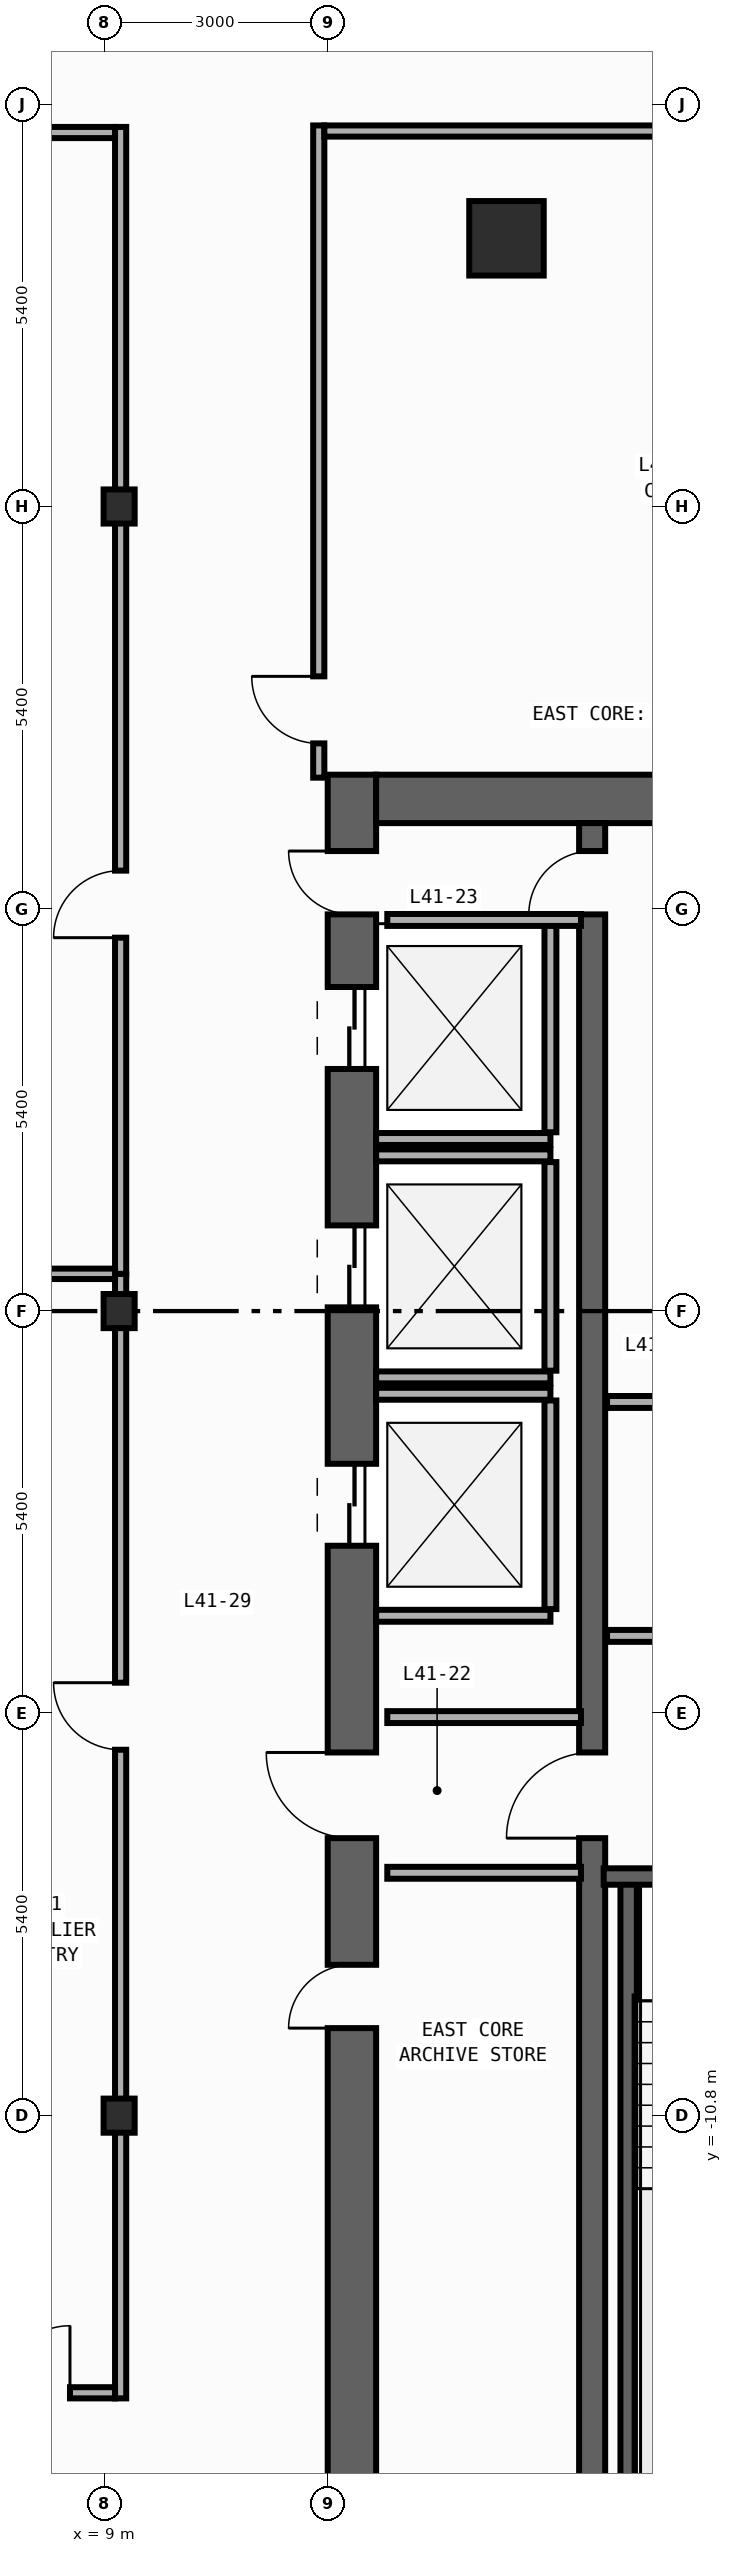
"""IFC4 building model, lengths in metres.
Left out: names, types, materials, properties, quantities, classifications, styles, units other than length and angle.
Written with IfcOpenShell. Run it as: python <this file> out.ifc"""

import sys

from ifc_helpers import new_model, si_unit, direction, frame, frame_2d, origin, origin_2d, place, context, subcontext, project, spatial, rectangle, i_section, extrude, element, fill, save


model = new_model("IFC4")
c1 = context("Model", 3, precision=1e-05, world=origin(), true_north=direction((0.0, 1.0)))
c2 = subcontext(c1, "Body", "Model", "MODEL_VIEW")
j1 = project(units=[si_unit("LENGTHUNIT", "METRE"), si_unit("PLANEANGLEUNIT", "RADIAN")], contexts=[c1])
p1 = place(None, origin())
s1 = spatial("IfcSite", under=j1, at=p1, CompositionType="ELEMENT")
p2 = place(p1, origin())
s2 = spatial("IfcBuilding", under=s1, at=p2, CompositionType="ELEMENT")
p3 = place(p2, frame((0.0, 0.0, 180.2)))
s3 = spatial("IfcBuildingStorey", under=s2, at=p3, CompositionType="ELEMENT", Elevation=180.2)
p4 = place(p3, frame((12.325, -19.8, 0.0), z_axis=(0.0, 0.0, 1.0), x_axis=(0.0, 1.0, 0.0)))
e1 = element("IfcWall", 1, at=p4, inside=s3, PredefinedType="SHEAR", context=c2, shape_type="SweptSolid", body=[
    extrude(rectangle(XDim=27.0, YDim=0.65, at=frame_2d((13.5, 0.0))), origin(), (0.0, 0.0, 1.0), 3.54),
])
p5 = place(p4, frame((23.05, 0.0, 0.0)))
e2 = element("IfcOpeningElement", 2, at=p5, cuts=e1, PredefinedType="OPENING", context=c2, shape_type="SweptSolid", body=[
    extrude(rectangle(XDim=1.1, YDim=2.2, at=frame_2d((0.55, 1.1))), frame((0.0, 0.335, 0.0), z_axis=(0.0, -1.0, 0.0), x_axis=(1.0, 0.0, 0.0)), (0.0, 0.0, 1.0), 0.67),
])
p6 = place(p4, frame((19.85, 0.0, 0.0)))
e3 = element("IfcOpeningElement", 3, at=p6, cuts=e1, PredefinedType="OPENING", context=c2, shape_type="SweptSolid", body=[
    extrude(rectangle(XDim=1.1, YDim=2.2, at=frame_2d((0.55, 1.1))), frame((0.0, 0.335, 0.0), z_axis=(0.0, -1.0, 0.0), x_axis=(1.0, 0.0, 0.0)), (0.0, 0.0, 1.0), 0.67),
])
p7 = place(p4, frame((16.65, 0.0, 0.0)))
e4 = element("IfcOpeningElement", 4, at=p7, cuts=e1, PredefinedType="OPENING", context=c2, shape_type="SweptSolid", body=[
    extrude(rectangle(XDim=1.1, YDim=2.2, at=frame_2d((0.55, 1.1))), frame((0.0, 0.335, 0.0), z_axis=(0.0, -1.0, 0.0), x_axis=(1.0, 0.0, 0.0)), (0.0, 0.0, 1.0), 0.67),
])
p8 = place(p4, frame((10.175, 0.0, 0.0)))
e5 = element("IfcOpeningElement", 5, at=p8, cuts=e1, PredefinedType="OPENING", context=c2, shape_type="SweptSolid", body=[
    extrude(rectangle(XDim=0.85, YDim=2.1, at=frame_2d((0.425, 1.05))), frame((0.0, 0.335, 0.0), z_axis=(0.0, -1.0, 0.0), x_axis=(1.0, 0.0, 0.0)), (0.0, 0.0, 1.0), 0.67),
])
p9 = place(p4, frame((12.725, 0.0, 0.0)))
e6 = element("IfcOpeningElement", 6, at=p9, cuts=e1, PredefinedType="OPENING", context=c2, shape_type="SweptSolid", body=[
    extrude(rectangle(XDim=1.15, YDim=2.2, at=frame_2d((0.575, 1.1))), frame((0.0, 0.335, 0.0), z_axis=(0.0, -1.0, 0.0), x_axis=(1.0, 0.0, 0.0)), (0.0, 0.0, 1.0), 0.67),
])
p10 = place(p4, frame((25.125, 0.0, 0.0)))
e7 = element("IfcOpeningElement", 7, at=p10, cuts=e1, PredefinedType="OPENING", context=c2, shape_type="SweptSolid", body=[
    extrude(rectangle(XDim=0.85, YDim=2.1, at=frame_2d((0.425, 1.05))), frame((0.0, 0.335, 0.0), z_axis=(0.0, -1.0, 0.0), x_axis=(1.0, 0.0, 0.0)), (0.0, 0.0, 1.0), 0.67),
])
p11 = place(p3, frame((12.65, 6.875, 0.0), z_axis=(0.0, 0.0, 1.0), x_axis=(1.0, 0.0, 0.0)))
e8 = element("IfcWall", 8, at=p11, inside=s3, PredefinedType="SHEAR", context=c2, shape_type="SweptSolid", body=[
    extrude(rectangle(XDim=7.1, YDim=0.65, at=frame_2d((3.55, 0.0))), origin(), (0.0, 0.0, 1.0), 3.54),
])
p12 = place(p3, frame((15.55, -19.15, 0.0), z_axis=(0.0, 0.0, 1.0), x_axis=(0.0, 1.0, 0.0)))
e9 = element("IfcWall", 9, at=p12, inside=s3, PredefinedType="SHEAR", context=c2, shape_type="SweptSolid", body=[
    extrude(rectangle(XDim=25.7, YDim=0.35, at=frame_2d((12.85, 0.0))), origin(), (0.0, 0.0, 1.0), 3.54),
])
p13 = place(p12, frame((12.075, 0.0, 0.0)))
e10 = element("IfcOpeningElement", 10, at=p13, cuts=e9, PredefinedType="OPENING", context=c2, shape_type="SweptSolid", body=[
    extrude(rectangle(XDim=1.15, YDim=2.2, at=frame_2d((0.575, 1.1))), frame((0.0, 0.185, 0.0), z_axis=(0.0, -1.0, 0.0), x_axis=(1.0, 0.0, 0.0)), (0.0, 0.0, 1.0), 0.37),
])
p14 = place(p12, frame((24.475, 0.0, 0.0)))
e11 = element("IfcOpeningElement", 11, at=p14, cuts=e9, PredefinedType="OPENING", context=c2, shape_type="SweptSolid", body=[
    extrude(rectangle(XDim=0.85, YDim=2.1, at=frame_2d((0.425, 1.05))), frame((0.0, 0.185, 0.0), z_axis=(0.0, -1.0, 0.0), x_axis=(1.0, 0.0, 0.0)), (0.0, 0.0, 1.0), 0.37),
])
p15 = place(p3, frame((16.04, -19.01, 0.0), z_axis=(0.0, 0.0, 1.0), x_axis=(0.0, 1.0, 0.0)))
e12 = element("IfcWall", 12, at=p15, inside=s3, PredefinedType="SHEAR", context=c2, shape_type="SweptSolid", body=[
    extrude(rectangle(XDim=11.42, YDim=0.22, at=frame_2d((5.71, 0.0))), origin(), (0.0, 0.0, 1.0), 3.54),
])
p16 = place(p3, frame((19.77, -7.59, 0.0), z_axis=(0.0, 0.0, 1.0), x_axis=(-1.0, 0.0, 0.0)))
e13 = element("IfcWall", 13, at=p16, inside=s3, PredefinedType="SHEAR", context=c2, shape_type="SweptSolid", body=[
    extrude(rectangle(XDim=4.065, YDim=0.22, at=frame_2d((2.032, 0.0))), origin(), (0.0, 0.0, 1.0), 3.54),
])
p17 = place(p16, frame((1.08, 0.0, 0.0)))
e14 = element("IfcOpeningElement", 14, at=p17, cuts=e13, PredefinedType="OPENING", context=c2, shape_type="SweptSolid", body=[
    extrude(rectangle(XDim=1.1, YDim=2.2, at=frame_2d((0.55, 1.1))), frame((0.0, 0.12, 0.0), z_axis=(0.0, -1.0, 0.0), x_axis=(1.0, 0.0, 0.0)), (0.0, 0.0, 1.0), 0.24),
])
for number, where, z_axis, x_axis in (
    (15, (9.2, -10.8, 0.0), (0.0, 0.0, 1.0), (1.0, 0.0, 0.0)),
    (16, (9.2, 0.0, 0.0), (0.0, 0.0, 1.0), (1.0, 0.0, 0.0)),
    (17, (9.2, 10.8, 0.0), (0.0, 0.0, 1.0), (1.0, 0.0, 0.0)),
):
    element("IfcColumn", number, at=place(p3, frame(where, z_axis=z_axis, x_axis=x_axis)), inside=s3, PredefinedType="COLUMN", context=c2, shape_type="SweptSolid", body=[
        extrude(i_section(OverallWidth=0.417, OverallDepth=0.458, WebThickness=0.03, FlangeThickness=0.05, FilletRadius=0.022, at=origin_2d()), origin(), (0.0, 0.0, 1.0), 3.8),
    ])
p18 = place(p3, frame((14.4, 14.4, 0.0), z_axis=(0.0, 0.0, 1.0), x_axis=(1.0, 0.0, 0.0)))
e18 = element("IfcColumn", 18, at=p18, inside=s3, PredefinedType="COLUMN", context=c2, shape_type="SweptSolid", body=[
    extrude(rectangle(XDim=1.0, YDim=1.0, at=origin_2d()), origin(), (0.0, 0.0, 1.0), 3.8),
])
p19 = place(p3, frame((12.65, 2.31, 0.0), z_axis=(0.0, 0.0, 1.0), x_axis=(1.0, 0.0, 0.0)))
e19 = element("IfcWall", 19, at=p19, inside=s3, PredefinedType="STANDARD", context=c2, shape_type="SweptSolid", body=[
    extrude(rectangle(XDim=2.34, YDim=0.16, at=frame_2d((1.17, 0.0))), origin(), (0.0, 0.0, 1.0), 3.54),
])
p20 = place(p3, frame((14.99, 2.4, 0.0), z_axis=(0.0, 0.0, 1.0), x_axis=(0.0, 1.0, 0.0)))
e20 = element("IfcWall", 20, at=p20, inside=s3, PredefinedType="STANDARD", context=c2, shape_type="SweptSolid", body=[
    extrude(rectangle(XDim=2.8, YDim=0.16, at=frame_2d((1.4, 0.0))), origin(), (0.0, 0.0, 1.0), 3.54),
])
for number, where, z_axis, x_axis in (
    (21, (12.65, -0.89, 0.0), (0.0, 0.0, 1.0), (1.0, 0.0, 0.0)),
    (22, (12.65, 2.09, 0.0), (0.0, 0.0, 1.0), (1.0, 0.0, 0.0)),
):
    element("IfcWall", number, at=place(p3, frame(where, z_axis=z_axis, x_axis=x_axis)), inside=s3, PredefinedType="STANDARD", context=c2, shape_type="SweptSolid", body=[
        extrude(rectangle(XDim=2.34, YDim=0.16, at=frame_2d((1.17, 0.0))), origin(), (0.0, 0.0, 1.0), 3.54),
    ])
p21 = place(p3, frame((14.99, -0.8, 0.0), z_axis=(0.0, 0.0, 1.0), x_axis=(0.0, 1.0, 0.0)))
e23 = element("IfcWall", 23, at=p21, inside=s3, PredefinedType="STANDARD", context=c2, shape_type="SweptSolid", body=[
    extrude(rectangle(XDim=2.8, YDim=0.16, at=frame_2d((1.4, 0.0))), origin(), (0.0, 0.0, 1.0), 3.54),
])
for number, where, z_axis, x_axis in (
    (24, (12.65, -4.09, 0.0), (0.0, 0.0, 1.0), (1.0, 0.0, 0.0)),
    (25, (12.65, -1.11, 0.0), (0.0, 0.0, 1.0), (1.0, 0.0, 0.0)),
):
    element("IfcWall", number, at=place(p3, frame(where, z_axis=z_axis, x_axis=x_axis)), inside=s3, PredefinedType="STANDARD", context=c2, shape_type="SweptSolid", body=[
        extrude(rectangle(XDim=2.34, YDim=0.16, at=frame_2d((1.17, 0.0))), origin(), (0.0, 0.0, 1.0), 3.54),
    ])
p22 = place(p3, frame((14.99, -4.0, 0.0), z_axis=(0.0, 0.0, 1.0), x_axis=(0.0, 1.0, 0.0)))
e26 = element("IfcWall", 26, at=p22, inside=s3, PredefinedType="STANDARD", context=c2, shape_type="SweptSolid", body=[
    extrude(rectangle(XDim=2.8, YDim=0.16, at=frame_2d((1.4, 0.0))), origin(), (0.0, 0.0, 1.0), 3.54),
])
p23 = place(p3, frame((15.75, -4.36, 0.0), z_axis=(0.0, 0.0, 1.0), x_axis=(1.0, 0.0, 0.0)))
e27 = element("IfcWall", 27, at=p23, inside=s3, PredefinedType="STANDARD", context=c2, shape_type="SweptSolid", body=[
    extrude(rectangle(XDim=3.8, YDim=0.16, at=frame_2d((1.9, 0.0))), origin(), (0.0, 0.0, 1.0), 3.54),
])
p24 = place(p23, frame((1.47, 0.0, 0.0)))
e28 = element("IfcOpeningElement", 28, at=p24, cuts=e27, PredefinedType="OPENING", context=c2, shape_type="SweptSolid", body=[
    extrude(rectangle(XDim=1.15, YDim=2.2, at=frame_2d((0.575, 1.1))), frame((0.0, 0.09, 0.0), z_axis=(0.0, -1.0, 0.0), x_axis=(1.0, 0.0, 0.0)), (0.0, 0.0, 1.0), 0.18),
])
p25 = place(p3, frame((15.75, -1.22, 0.0), z_axis=(0.0, 0.0, 1.0), x_axis=(1.0, 0.0, 0.0)))
e29 = element("IfcWall", 29, at=p25, inside=s3, PredefinedType="STANDARD", context=c2, shape_type="SweptSolid", body=[
    extrude(rectangle(XDim=3.8, YDim=0.16, at=frame_2d((1.9, 0.0))), origin(), (0.0, 0.0, 1.0), 3.54),
])
for number, where, z_axis, x_axis in (
    (30, (12.8, -5.45, 0.0), (0.0, 0.0, 1.0), (1.0, 0.0, 0.0)),
    (31, (12.8, -7.54, 0.0), (0.0, 0.0, 1.0), (1.0, 0.0, 0.0)),
    (32, (12.8, 5.25, 0.0), (0.0, 0.0, 1.0), (1.0, 0.0, 0.0)),
):
    element("IfcWall", number, at=place(p3, frame(where, z_axis=z_axis, x_axis=x_axis)), inside=s3, PredefinedType="STANDARD", context=c2, shape_type="SweptSolid", body=[
        extrude(rectangle(XDim=2.6, YDim=0.16, at=frame_2d((1.3, 0.0))), origin(), (0.0, 0.0, 1.0), 3.54),
    ])
p26 = place(p3, frame((9.22, -14.595, 0.0), z_axis=(0.0, 0.0, 1.0), x_axis=(0.0, 1.0, 0.0)))
e33 = element("IfcWall", 33, at=p26, inside=s3, PredefinedType="PARTITIONING", context=c2, shape_type="SweptSolid", body=[
    extrude(rectangle(XDim=15.095, YDim=0.15, at=frame_2d((7.547, 0.0))), origin(), (0.0, 0.0, 1.0), 2.952),
])
p27 = place(p26, frame((8.707, 0.0, 0.0)))
e34 = element("IfcOpeningElement", 34, at=p27, cuts=e33, PredefinedType="OPENING", context=c2, shape_type="SweptSolid", body=[
    extrude(rectangle(XDim=0.9, YDim=2.15, at=frame_2d((0.45, 1.075))), frame((0.0, 0.085, 0.0), z_axis=(0.0, -1.0, 0.0), x_axis=(1.0, 0.0, 0.0)), (0.0, 0.0, 1.0), 0.17),
])
p28 = place(p3, frame((9.22, 0.5, 0.0), z_axis=(0.0, 0.0, 1.0), x_axis=(0.0, 1.0, 0.0)))
e35 = element("IfcWall", 35, at=p28, inside=s3, PredefinedType="PARTITIONING", context=c2, shape_type="SweptSolid", body=[
    extrude(rectangle(XDim=15.395, YDim=0.15, at=frame_2d((7.698, 0.0))), origin(), (0.0, 0.0, 1.0), 2.952),
])
p29 = place(p28, frame((4.512, 0.0, 0.0)))
e36 = element("IfcOpeningElement", 36, at=p29, cuts=e35, PredefinedType="OPENING", context=c2, shape_type="SweptSolid", body=[
    extrude(rectangle(XDim=0.9, YDim=2.15, at=frame_2d((0.45, 1.075))), frame((0.0, 0.085, 0.0), z_axis=(0.0, -1.0, 0.0), x_axis=(1.0, 0.0, 0.0)), (0.0, 0.0, 1.0), 0.17),
])
p30 = place(p3, frame((11.88, 7.16, 0.0), z_axis=(0.0, 0.0, 1.0), x_axis=(0.0, 1.0, 0.0)))
e37 = element("IfcWall", 37, at=p30, inside=s3, PredefinedType="PARTITIONING", context=c2, shape_type="SweptSolid", body=[
    extrude(rectangle(XDim=8.755, YDim=0.15, at=frame_2d((4.377, 0.0))), origin(), (0.0, 0.0, 1.0), 3.54),
])
p31 = place(p30, frame((0.46, 0.0, 0.0)))
e38 = element("IfcOpeningElement", 38, at=p31, cuts=e37, PredefinedType="OPENING", context=c2, shape_type="SweptSolid", body=[
    extrude(rectangle(XDim=0.9, YDim=2.15, at=frame_2d((0.45, 1.075))), frame((0.0, 0.085, 0.0), z_axis=(0.0, -1.0, 0.0), x_axis=(1.0, 0.0, 0.0)), (0.0, 0.0, 1.0), 0.17),
])
p32 = place(p3, frame((-0.32, 15.82, 0.0), z_axis=(0.0, 0.0, 1.0), x_axis=(1.0, 0.0, 0.0)))
e39 = element("IfcWall", 39, at=p32, inside=s3, PredefinedType="PARTITIONING", context=c2, shape_type="SweptSolid", body=[
    extrude(rectangle(XDim=9.465, YDim=0.15, at=frame_2d((4.732, 0.0))), origin(), (0.0, 0.0, 1.0), 3.54),
])
p33 = place(p32, frame((6.898, 0.0, 0.0)))
e40 = element("IfcOpeningElement", 40, at=p33, cuts=e39, PredefinedType="OPENING", context=c2, shape_type="SweptSolid", body=[
    extrude(rectangle(XDim=0.9, YDim=2.15, at=frame_2d((0.45, 1.075))), frame((0.0, 0.085, 0.0), z_axis=(0.0, -1.0, 0.0), x_axis=(1.0, 0.0, 0.0)), (0.0, 0.0, 1.0), 0.17),
])
p34 = place(p3, frame((11.955, 15.84, 0.0), z_axis=(0.0, 0.0, 1.0), x_axis=(1.0, 0.0, 0.0)))
e41 = element("IfcWall", 41, at=p34, inside=s3, PredefinedType="PARTITIONING", context=c2, shape_type="SweptSolid", body=[
    extrude(rectangle(XDim=10.5, YDim=0.15, at=frame_2d((5.25, 0.0))), origin(), (0.0, 0.0, 1.0), 3.54),
])
p35 = place(p34, frame((4.901, 0.0, 0.0)))
e42 = element("IfcOpeningElement", 42, at=p35, cuts=e41, PredefinedType="OPENING", context=c2, shape_type="SweptSolid", body=[
    extrude(rectangle(XDim=0.9, YDim=2.15, at=frame_2d((0.45, 1.075))), frame((0.0, 0.085, 0.0), z_axis=(0.0, -1.0, 0.0), x_axis=(1.0, 0.0, 0.0)), (0.0, 0.0, 1.0), 0.17),
])
p36 = place(p3, frame((7.18, -14.52, 0.0), z_axis=(0.0, 0.0, 1.0), x_axis=(1.0, 0.0, 0.0)))
e43 = element("IfcWall", 43, at=p36, inside=s3, PredefinedType="PARTITIONING", context=c2, shape_type="SweptSolid", body=[
    extrude(rectangle(XDim=1.965, YDim=0.15, at=frame_2d((0.982, 0.0))), origin(), (0.0, 0.0, 1.0), 3.54),
])
p37 = place(p36, frame((0.46, 0.0, 0.0)))
e44 = element("IfcOpeningElement", 44, at=p37, cuts=e43, PredefinedType="OPENING", context=c2, shape_type="SweptSolid", body=[
    extrude(rectangle(XDim=0.9, YDim=2.15, at=frame_2d((0.45, 1.075))), frame((0.0, 0.085, 0.0), z_axis=(0.0, -1.0, 0.0), x_axis=(1.0, 0.0, 0.0)), (0.0, 0.0, 1.0), 0.17),
])
p38 = place(p3, frame((7.02, 0.5, 0.0), z_axis=(0.0, 0.0, 1.0), x_axis=(1.0, 0.0, 0.0)))
e45 = element("IfcWall", 45, at=p38, inside=s3, PredefinedType="PARTITIONING", context=c2, shape_type="SweptSolid", body=[
    extrude(rectangle(XDim=2.125, YDim=0.14, at=frame_2d((1.062, 0.0))), origin(), (0.0, 0.0, 1.0), 3.54),
])
p39 = place(p5, origin())
e46 = element("IfcDoor", 46, at=p39, inside=s3, OperationType="DOUBLE_DOOR_SLIDING", PredefinedType="DOOR", context=c2, shape_type="SweptSolid", body=[
    extrude(rectangle(XDim=1.1, YDim=2.2, at=frame_2d((0.55, 1.1))), frame((0.0, 0.025, 0.0), z_axis=(0.0, -1.0, 0.0), x_axis=(1.0, 0.0, 0.0)), (0.0, 0.0, 1.0), 0.05),
])
fill(e2, e46)
p40 = place(p6, origin())
e47 = element("IfcDoor", 47, at=p40, inside=s3, OperationType="DOUBLE_DOOR_SLIDING", PredefinedType="DOOR", context=c2, shape_type="SweptSolid", body=[
    extrude(rectangle(XDim=1.1, YDim=2.2, at=frame_2d((0.55, 1.1))), frame((0.0, 0.025, 0.0), z_axis=(0.0, -1.0, 0.0), x_axis=(1.0, 0.0, 0.0)), (0.0, 0.0, 1.0), 0.05),
])
fill(e3, e47)
p41 = place(p7, origin())
e48 = element("IfcDoor", 48, at=p41, inside=s3, OperationType="DOUBLE_DOOR_SLIDING", PredefinedType="DOOR", context=c2, shape_type="SweptSolid", body=[
    extrude(rectangle(XDim=1.1, YDim=2.2, at=frame_2d((0.55, 1.1))), frame((0.0, 0.025, 0.0), z_axis=(0.0, -1.0, 0.0), x_axis=(1.0, 0.0, 0.0)), (0.0, 0.0, 1.0), 0.05),
])
fill(e4, e48)
p42 = place(p8, origin())
e49 = element("IfcDoor", 49, at=p42, inside=s3, OperationType="SINGLE_SWING_LEFT", PredefinedType="DOOR", context=c2, shape_type="SweptSolid", body=[
    extrude(rectangle(XDim=0.85, YDim=2.1, at=frame_2d((0.425, 1.05))), frame((0.0, 0.025, 0.0), z_axis=(0.0, -1.0, 0.0), x_axis=(1.0, 0.0, 0.0)), (0.0, 0.0, 1.0), 0.05),
])
fill(e5, e49)
p43 = place(p9, origin())
e50 = element("IfcDoor", 50, at=p43, inside=s3, OperationType="SINGLE_SWING_RIGHT", PredefinedType="DOOR", context=c2, shape_type="SweptSolid", body=[
    extrude(rectangle(XDim=1.15, YDim=2.2, at=frame_2d((0.575, 1.1))), frame((0.0, 0.025, 0.0), z_axis=(0.0, -1.0, 0.0), x_axis=(1.0, 0.0, 0.0)), (0.0, 0.0, 1.0), 0.05),
])
fill(e6, e50)
p44 = place(p13, origin())
e51 = element("IfcDoor", 51, at=p44, inside=s3, OperationType="SINGLE_SWING_LEFT", PredefinedType="DOOR", context=c2, shape_type="SweptSolid", body=[
    extrude(rectangle(XDim=1.15, YDim=2.2, at=frame_2d((0.575, 1.1))), frame((0.0, 0.025, 0.0), z_axis=(0.0, -1.0, 0.0), x_axis=(1.0, 0.0, 0.0)), (0.0, 0.0, 1.0), 0.05),
])
fill(e10, e51)
p45 = place(p10, origin())
e52 = element("IfcDoor", 52, at=p45, inside=s3, OperationType="SINGLE_SWING_RIGHT", PredefinedType="DOOR", context=c2, shape_type="SweptSolid", body=[
    extrude(rectangle(XDim=0.85, YDim=2.1, at=frame_2d((0.425, 1.05))), frame((0.0, 0.025, 0.0), z_axis=(0.0, -1.0, 0.0), x_axis=(1.0, 0.0, 0.0)), (0.0, 0.0, 1.0), 0.05),
])
fill(e7, e52)
p46 = place(p14, origin())
e53 = element("IfcDoor", 53, at=p46, inside=s3, OperationType="SINGLE_SWING_LEFT", PredefinedType="DOOR", context=c2, shape_type="SweptSolid", body=[
    extrude(rectangle(XDim=0.85, YDim=2.1, at=frame_2d((0.425, 1.05))), frame((0.0, 0.025, 0.0), z_axis=(0.0, -1.0, 0.0), x_axis=(1.0, 0.0, 0.0)), (0.0, 0.0, 1.0), 0.05),
])
fill(e11, e53)
p47 = place(p27, origin())
e54 = element("IfcDoor", 54, at=p47, inside=s3, OperationType="SINGLE_SWING_RIGHT", PredefinedType="DOOR", context=c2, shape_type="SweptSolid", body=[
    extrude(rectangle(XDim=0.9, YDim=2.15, at=frame_2d((0.45, 1.075))), frame((0.0, 0.025, 0.0), z_axis=(0.0, -1.0, 0.0), x_axis=(1.0, 0.0, 0.0)), (0.0, 0.0, 1.0), 0.05),
])
fill(e34, e54)
p48 = place(p29, origin())
e55 = element("IfcDoor", 55, at=p48, inside=s3, OperationType="SINGLE_SWING_LEFT", PredefinedType="DOOR", context=c2, shape_type="SweptSolid", body=[
    extrude(rectangle(XDim=0.9, YDim=2.15, at=frame_2d((0.45, 1.075))), frame((0.0, 0.025, 0.0), z_axis=(0.0, -1.0, 0.0), x_axis=(1.0, 0.0, 0.0)), (0.0, 0.0, 1.0), 0.05),
])
fill(e36, e55)
p49 = place(p31, origin())
e56 = element("IfcDoor", 56, at=p49, inside=s3, OperationType="SINGLE_SWING_RIGHT", PredefinedType="DOOR", context=c2, shape_type="SweptSolid", body=[
    extrude(rectangle(XDim=0.9, YDim=2.15, at=frame_2d((0.45, 1.075))), frame((0.0, 0.025, 0.0), z_axis=(0.0, -1.0, 0.0), x_axis=(1.0, 0.0, 0.0)), (0.0, 0.0, 1.0), 0.05),
])
fill(e38, e56)
p50 = place(p37, origin())
e57 = element("IfcDoor", 57, at=p50, inside=s3, OperationType="SINGLE_SWING_RIGHT", PredefinedType="DOOR", context=c2, shape_type="SweptSolid", body=[
    extrude(rectangle(XDim=0.9, YDim=2.15, at=frame_2d((0.45, 1.075))), frame((0.0, 0.025, 0.0), z_axis=(0.0, -1.0, 0.0), x_axis=(1.0, 0.0, 0.0)), (0.0, 0.0, 1.0), 0.05),
])
fill(e44, e57)
save(model, sys.argv[1])
